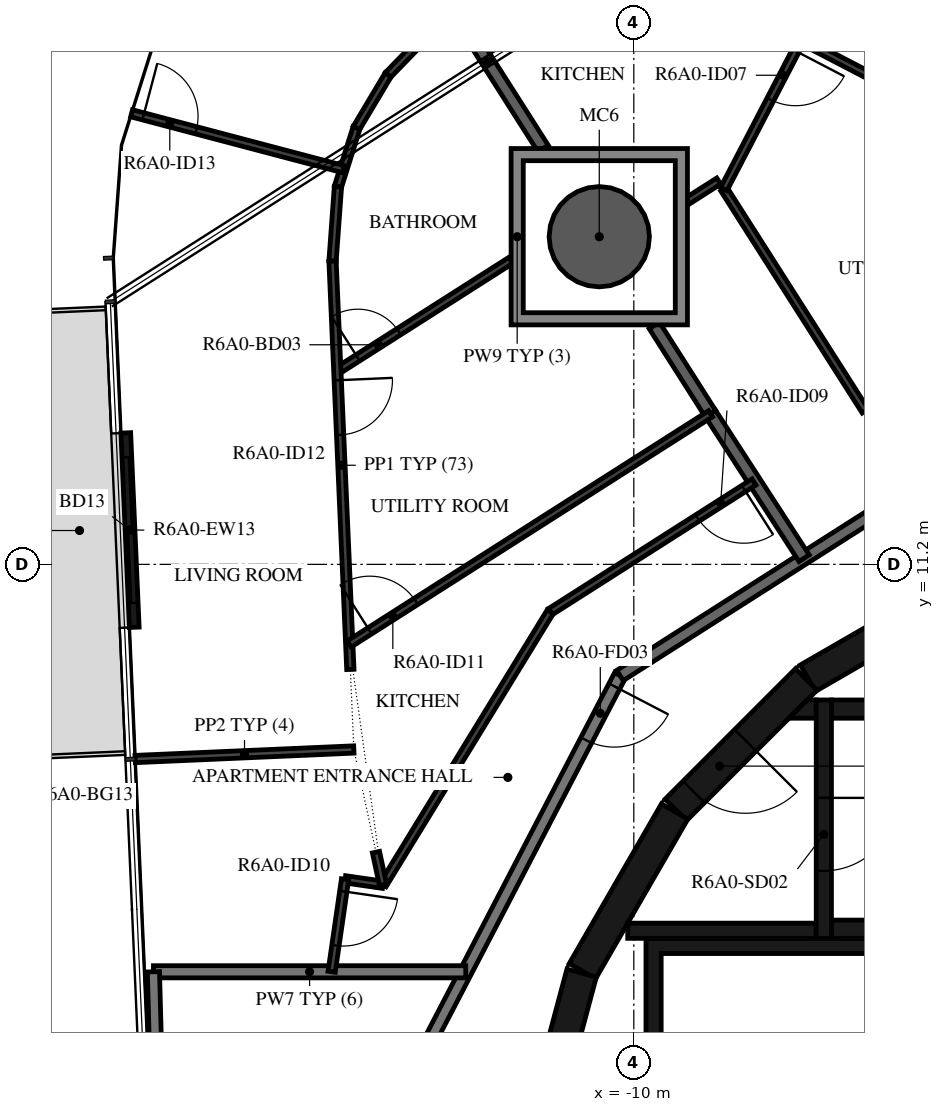
"""IFC4 building model, lengths in metres.
Left out: names, types, materials, properties, quantities, classifications, styles, units other than length and angle.
Written with IfcOpenShell. Run it as: python <this file> out.ifc"""

import sys

from ifc_helpers import new_model, si_unit, direction, frame, frame_2d, origin, origin_2d, place, context, subcontext, project, spatial, polyline, rectangle, hollow_circle, outline, extrude, element, fill, save


model = new_model("IFC4")
c1 = context("Model", 3, precision=1e-05, world=origin(), true_north=direction((0.0, 1.0)))
c2 = subcontext(c1, "Body", "Model", "MODEL_VIEW")
j1 = project(units=[si_unit("LENGTHUNIT", "METRE"), si_unit("PLANEANGLEUNIT", "RADIAN")], contexts=[c1])
p1 = place(None, origin())
s1 = spatial("IfcSite", under=j1, at=p1, CompositionType="ELEMENT")
p2 = place(p1, origin())
s2 = spatial("IfcBuilding", under=s1, at=p2, CompositionType="ELEMENT")
p3 = place(p2, frame((0.0, 0.0, 233.7)))
s3 = spatial("IfcBuildingStorey", under=s2, at=p3, CompositionType="ELEMENT", Elevation=233.7)
p4 = place(p3, frame((-10.568, 16.588, -0.38), z_axis=(0.0, 0.0, 1.0), x_axis=(1.0, 0.0, 0.0)))
e1 = element("IfcColumn", 1, at=p4, inside=s3, PredefinedType="COLUMN", context=c2, shape_type="SweptSolid", body=[
    extrude(hollow_circle(Radius=0.825, WallThickness=0.04, at=origin_2d()), origin(), (0.0, 0.0, 1.0), 3.5),
])
p5 = place(p3, frame((-18.355, 13.362, 0.0), z_axis=(0.0, 0.0, 1.0), x_axis=(0.043639181999, -0.999047357133, 0.0)))
e2 = element("IfcWall", 2, at=p5, inside=s3, PredefinedType="STANDARD", context=c2, shape_type="SweptSolid", body=[
    extrude(rectangle(XDim=3.2, YDim=0.16, at=frame_2d((1.6, 0.0))), origin(), (0.0, 0.0, 1.0), 3.12),
])
p6 = place(p5, frame((0.4, 0.0, 0.0)))
e3 = element("IfcOpeningElement", 3, at=p6, cuts=e2, PredefinedType="OPENING", context=c2, shape_type="SweptSolid", body=[
    extrude(rectangle(XDim=2.4, YDim=2.4, at=frame_2d((1.2, 1.2))), frame((0.0, 0.09, 0.0), z_axis=(0.0, -1.0, 0.0), x_axis=(1.0, 0.0, 0.0)), (0.0, 0.0, 1.0), 0.18),
])
p7 = place(p3, frame((-4.51, 10.845, 0.0), z_axis=(0.0, 0.0, 1.0), x_axis=(-0.865975092491, -0.500087131594, 0.0)))
e4 = element("IfcWall", 4, at=p7, inside=s3, PredefinedType="SHEAR", context=c2, shape_type="SweptSolid", body=[
    extrude(rectangle(XDim=3.033, YDim=0.5, at=frame_2d((1.516, 0.0))), origin(), (0.0, 0.0, 1.0), 3.12),
])
p8 = place(p3, frame((-7.164, 9.308, 0.0), z_axis=(0.0, 0.0, 1.0), x_axis=(-0.707106781187, -0.707106781187, 0.0)))
e5 = element("IfcWall", 5, at=p8, inside=s3, PredefinedType="SHEAR", context=c2, shape_type="SweptSolid", body=[
    extrude(rectangle(XDim=3.032, YDim=0.5, at=frame_2d((1.516, 0.0))), origin(), (0.0, 0.0, 1.0), 3.12),
])
p9 = place(p8, frame((1.416, 0.0, 0.0)))
e6 = element("IfcOpeningElement", 6, at=p9, cuts=e5, PredefinedType="OPENING", context=c2, shape_type="SweptSolid", body=[
    extrude(rectangle(XDim=1.2, YDim=2.1, at=frame_2d((0.6, 1.05))), frame((0.0, 0.26, 0.0), z_axis=(0.0, -1.0, 0.0), x_axis=(1.0, 0.0, 0.0)), (0.0, 0.0, 1.0), 0.52),
])
for number, where, z_axis, x_axis in (
    (7, (-9.329, 7.137, 0.0), (0.0, 0.0, 1.0), (-0.5, -0.866, 0.0)),
    (8, (-10.858, 4.479, 0.0), (0.0, 0.0, 1.0), (-0.259, -0.966, 0.0)),
):
    element("IfcWall", number, at=place(p3, frame(where, z_axis=z_axis, x_axis=x_axis)), inside=s3, PredefinedType="SHEAR", context=c2, shape_type="SweptSolid", body=[
        extrude(rectangle(XDim=3.033, YDim=0.5, at=frame_2d((1.516, 0.0))), origin(), (0.0, 0.0, 1.0), 3.12),
    ])
for number, where, z_axis, x_axis in (
    (9, (-6.75, 5.2, 0.0), (0.0, 0.0, 1.0), (1.0, 0.0, 0.0)),
    (10, (-6.75, 8.82, 0.0), (0.0, 0.0, 1.0), (1.0, 0.0, 0.0)),
):
    element("IfcWall", number, at=place(p3, frame(where, z_axis=z_axis, x_axis=x_axis)), inside=s3, PredefinedType="SHEAR", context=c2, shape_type="SweptSolid", body=[
        extrude(rectangle(XDim=6.75, YDim=0.3, at=frame_2d((3.375, 0.0))), origin(), (0.0, 0.0, 1.0), 3.12),
    ])
p10 = place(p3, frame((-6.875, 8.97, 0.0), z_axis=(0.0, 0.0, 1.0), x_axis=(0.0, -1.0, 0.0)))
e11 = element("IfcWall", 11, at=p10, inside=s3, PredefinedType="SHEAR", context=c2, shape_type="SweptSolid", body=[
    extrude(rectangle(XDim=3.92, YDim=0.25, at=frame_2d((1.96, 0.0))), origin(), (0.0, 0.0, 1.0), 3.12),
])
p11 = place(p10, frame((1.61, 0.0, 0.0)))
e12 = element("IfcOpeningElement", 12, at=p11, cuts=e11, PredefinedType="OPENING", context=c2, shape_type="SweptSolid", body=[
    extrude(rectangle(XDim=1.2, YDim=2.1, at=frame_2d((0.6, 1.05))), frame((0.0, 0.135, 0.0), z_axis=(0.0, -1.0, 0.0), x_axis=(1.0, 0.0, 0.0)), (0.0, 0.0, 1.0), 0.27),
])
p12 = place(p3, frame((-7.0, 5.175, 0.0), z_axis=(0.0, 0.0, 1.0), x_axis=(-1.0, 0.0, 0.0)))
e13 = element("IfcWall", 13, at=p12, inside=s3, PredefinedType="SHEAR", context=c2, shape_type="SweptSolid", body=[
    extrude(rectangle(XDim=3.1, YDim=0.25, at=frame_2d((1.55, 0.0))), origin(), (0.0, 0.0, 1.0), 3.12),
])
p13 = place(p3, origin())
e14 = element("IfcWall", 14, at=p13, inside=s3, PredefinedType="SHEAR", context=c2, shape_type="SweptSolid", body=[
    extrude(outline(polyline([(-7.148, 8.97), (-7.0, 8.97), (-7.0, 8.67), (-7.448, 8.67), (-7.148, 8.97)])), origin(), (0.0, 0.0, 1.0), 3.12),
])
p14 = place(p3, origin())
e15 = element("IfcWall", 15, at=p14, inside=s3, PredefinedType="SHEAR", context=c2, shape_type="SweptSolid", body=[
    extrude(outline(polyline([(-9.55, 4.8), (-5.5, 4.8), (-5.5, 1.9), (-5.25, 1.9), (-5.25, 4.8), (-1.2, 4.8), (-1.2, 1.9), (-0.95, 1.9), (-0.95, 4.8), (0.95, 4.8), (0.95, 1.9), (1.2, 1.9), (1.2, 4.8), (3.1, 4.8), (3.1, 1.9), (3.35, 1.9), (3.35, 4.8), (5.25, 4.8), (5.25, 1.9), (5.5, 1.9), (5.5, 4.8), (7.4, 4.8), (7.4, 1.9), (7.65, 1.9), (7.65, 4.8), (9.55, 4.8), (9.55, 1.9), (9.8, 1.9), (9.8, 4.8), (9.8, 5.05), (-9.8, 5.05), (-9.8, 4.8), (-9.8, 1.9), (-9.55, 1.9), (-9.55, 4.8)])), origin(), (0.0, 0.0, 1.0), 3.12),
])
p15 = place(p3, frame((-10.228, 9.372, 0.0), z_axis=(0.0, 0.0, 1.0), x_axis=(-0.461759464021, -0.887005184532, 0.0)))
e16 = element("IfcWall", 16, at=p15, inside=s3, PredefinedType="STANDARD", context=c2, shape_type="SweptSolid", body=[
    extrude(rectangle(XDim=7.181, YDim=0.2, at=frame_2d((3.591, 0.0))), origin(), (0.0, 0.0, 1.0), 3.12),
])
p16 = place(p15, frame((0.2, 0.0, 0.0)))
e17 = element("IfcOpeningElement", 17, at=p16, cuts=e16, PredefinedType="OPENING", context=c2, shape_type="SweptSolid", body=[
    extrude(rectangle(XDim=1.0, YDim=2.1, at=frame_2d((0.5, 1.05))), frame((0.0, 0.11, 0.0), z_axis=(0.0, -1.0, 0.0), x_axis=(1.0, 0.0, 0.0)), (0.0, 0.0, 1.0), 0.22),
])
p17 = place(p3, frame((-4.172, 13.231, 0.0), z_axis=(0.0, 0.0, 1.0), x_axis=(-0.843388394728, -0.537304397561, 0.0)))
e18 = element("IfcWall", 18, at=p17, inside=s3, PredefinedType="STANDARD", context=c2, shape_type="SweptSolid", body=[
    extrude(rectangle(XDim=7.181, YDim=0.2, at=frame_2d((3.59, 0.0))), origin(), (0.0, 0.0, 1.0), 3.12),
])
p18 = place(p3, frame((-12.764, 4.5, 0.0), z_axis=(0.0, 0.0, 1.0), x_axis=(-1.0, 0.0, 0.0)))
e19 = element("IfcWall", 19, at=p18, inside=s3, PredefinedType="STANDARD", context=c2, shape_type="SweptSolid", body=[
    extrude(rectangle(XDim=5.135, YDim=0.2, at=frame_2d((2.568, 0.0))), origin(), (0.0, 0.0, 1.0), 3.12),
])
p19 = place(p3, frame((-17.9, 4.5, 0.0), z_axis=(0.0, 0.0, 1.0), x_axis=(0.027204178319, -0.999629897853, 0.0)))
e20 = element("IfcWall", 20, at=p19, inside=s3, PredefinedType="STANDARD", context=c2, shape_type="SweptSolid", body=[
    extrude(rectangle(XDim=2.468, YDim=0.2, at=frame_2d((1.234, 0.0))), origin(), (0.0, 0.0, 1.0), 3.12),
])
p20 = place(p3, frame((-8.738, 13.677, 0.0), z_axis=(0.0, 0.0, 1.0), x_axis=(0.54358037296, -0.839357121929, 0.0)))
e21 = element("IfcWall", 21, at=p20, inside=s3, PredefinedType="STANDARD", context=c2, shape_type="SweptSolid", body=[
    extrude(rectangle(XDim=2.83, YDim=0.2, at=frame_2d((1.415, 0.0))), origin(), (0.0, 0.0, 1.0), 3.12),
])
p21 = place(p3, frame((-9.663, 15.129, 0.0), z_axis=(0.0, 0.0, 1.0), x_axis=(0.537205715853, -0.843451254581, 0.0)))
e22 = element("IfcWall", 22, at=p21, inside=s3, PredefinedType="STANDARD", context=c2, shape_type="SweptSolid", body=[
    extrude(rectangle(XDim=1.722, YDim=0.2, at=frame_2d((0.861, 0.0))), origin(), (0.0, 0.0, 1.0), 3.12),
])
p22 = place(p3, frame((-14.837, 23.29, 0.0), z_axis=(0.0, 0.0, 1.0), x_axis=(0.537316863221, -0.843380452998, 0.0)))
e23 = element("IfcWall", 23, at=p22, inside=s3, PredefinedType="STANDARD", context=c2, shape_type="SweptSolid", body=[
    extrude(rectangle(XDim=6.227, YDim=0.2, at=frame_2d((3.113, 0.0))), origin(), (0.0, 0.0, 1.0), 3.12),
])
p23 = place(p3, frame((-4.639, 14.712, 0.0), z_axis=(0.0, 0.0, 1.0), x_axis=(-0.843361471414, -0.537346655833, 0.0)))
e24 = element("IfcWall", 24, at=p23, inside=s3, PredefinedType="PARTITIONING", context=c2, shape_type="SweptSolid", body=[
    extrude(rectangle(XDim=1.844, YDim=0.12, at=frame_2d((0.922, 0.0))), origin(), (0.0, 0.0, 1.0), 3.12),
])
p24 = place(p23, frame((0.2, 0.0, 0.0)))
e25 = element("IfcOpeningElement", 25, at=p24, cuts=e24, PredefinedType="OPENING", context=c2, shape_type="SweptSolid", body=[
    extrude(rectangle(XDim=0.9, YDim=2.1, at=frame_2d((0.45, 1.05))), frame((0.0, 0.07, 0.0), z_axis=(0.0, -1.0, 0.0), x_axis=(1.0, 0.0, 0.0)), (0.0, 0.0, 1.0), 0.14),
])
p25 = place(p3, frame((-6.194, 13.721, 0.0), z_axis=(0.0, 0.0, 1.0), x_axis=(-0.537316807294, 0.843380488629, 0.0)))
e26 = element("IfcWall", 26, at=p25, inside=s3, PredefinedType="PARTITIONING", context=c2, shape_type="SweptSolid", body=[
    extrude(rectangle(XDim=4.331, YDim=0.12, at=frame_2d((2.165, 0.0))), origin(), (0.0, 0.0, 1.0), 3.12),
])
p26 = place(p3, frame((-8.604, 17.504, 0.0), z_axis=(0.0, 0.0, 1.0), x_axis=(-0.843265746233, -0.537496866251, 0.0)))
e27 = element("IfcWall", 27, at=p26, inside=s3, PredefinedType="PARTITIONING", context=c2, shape_type="SweptSolid", body=[
    extrude(rectangle(XDim=0.61, YDim=0.12, at=frame_2d((0.305, 0.0))), origin(), (0.0, 0.0, 1.0), 3.12),
])
p27 = place(p3, frame((-8.35, 20.394, 0.0), z_axis=(0.0, 0.0, 1.0), x_axis=(0.887020940825, -0.461729196107, 0.0)))
e28 = element("IfcWall", 28, at=p27, inside=s3, PredefinedType="PARTITIONING", context=c2, shape_type="SweptSolid", body=[
    extrude(rectangle(XDim=11.678, YDim=0.12, at=frame_2d((5.839, 0.0))), origin(), (0.0, 0.0, 1.0), 3.12),
])
p28 = place(p3, frame((-7.247, 19.82, 0.0), z_axis=(0.0, 0.0, 1.0), x_axis=(-0.46174004932, -0.887015291218, 0.0)))
e29 = element("IfcWall", 29, at=p28, inside=s3, PredefinedType="PARTITIONING", context=c2, shape_type="SweptSolid", body=[
    extrude(rectangle(XDim=2.759, YDim=0.12, at=frame_2d((1.379, 0.0))), origin(), (0.0, 0.0, 1.0), 3.12),
])
p29 = place(p28, frame((0.2, 0.0, 0.0)))
e30 = element("IfcOpeningElement", 30, at=p29, cuts=e29, PredefinedType="OPENING", context=c2, shape_type="SweptSolid", body=[
    extrude(rectangle(XDim=0.9, YDim=2.1, at=frame_2d((0.45, 1.05))), frame((0.0, 0.07, 0.0), z_axis=(0.0, -1.0, 0.0), x_axis=(1.0, 0.0, 0.0)), (0.0, 0.0, 1.0), 0.14),
])
p30 = place(p3, frame((-8.023, 12.555, 0.0), z_axis=(0.0, 0.0, 1.0), x_axis=(-0.843408270233, -0.537273198385, 0.0)))
e31 = element("IfcWall", 31, at=p30, inside=s3, PredefinedType="PARTITIONING", context=c2, shape_type="SweptSolid", body=[
    extrude(rectangle(XDim=3.971, YDim=0.12, at=frame_2d((1.986, 0.0))), origin(), (0.0, 0.0, 1.0), 3.12),
])
p31 = place(p30, frame((0.2, 0.0, 0.0)))
e32 = element("IfcOpeningElement", 32, at=p31, cuts=e31, PredefinedType="OPENING", context=c2, shape_type="SweptSolid", body=[
    extrude(rectangle(XDim=0.9, YDim=2.1, at=frame_2d((0.45, 1.05))), frame((0.0, 0.07, 0.0), z_axis=(0.0, -1.0, 0.0), x_axis=(1.0, 0.0, 0.0)), (0.0, 0.0, 1.0), 0.14),
])
p32 = place(p3, frame((-11.373, 10.421, 0.0), z_axis=(0.0, 0.0, 1.0), x_axis=(-0.522435957358, -0.852678527031, 0.0)))
e33 = element("IfcWall", 33, at=p32, inside=s3, PredefinedType="PARTITIONING", context=c2, shape_type="SweptSolid", body=[
    extrude(rectangle(XDim=5.267, YDim=0.12, at=frame_2d((2.633, 0.0))), origin(), (0.0, 0.0, 1.0), 3.12),
])
p33 = place(p3, frame((-14.125, 5.931, 0.0), z_axis=(0.0, 0.0, 1.0), x_axis=(-0.989621518838, 0.143698467119, 0.0)))
e34 = element("IfcWall", 34, at=p33, inside=s3, PredefinedType="PARTITIONING", context=c2, shape_type="SweptSolid", body=[
    extrude(rectangle(XDim=0.63, YDim=0.12, at=frame_2d((0.315, 0.0))), origin(), (0.0, 0.0, 1.0), 3.12),
])
p34 = place(p3, frame((-14.748, 6.021, 0.0), z_axis=(0.0, 0.0, 1.0), x_axis=(-0.143888945672, -0.98959384159, 0.0)))
e35 = element("IfcWall", 35, at=p34, inside=s3, PredefinedType="PARTITIONING", context=c2, shape_type="SweptSolid", body=[
    extrude(rectangle(XDim=1.537, YDim=0.12, at=frame_2d((0.769, 0.0))), origin(), (0.0, 0.0, 1.0), 3.12),
])
p35 = place(p34, frame((0.2, 0.0, 0.0)))
e36 = element("IfcOpeningElement", 36, at=p35, cuts=e35, PredefinedType="OPENING", context=c2, shape_type="SweptSolid", body=[
    extrude(rectangle(XDim=0.9, YDim=2.1, at=frame_2d((0.45, 1.05))), frame((0.0, 0.07, 0.0), z_axis=(0.0, -1.0, 0.0), x_axis=(1.0, 0.0, 0.0)), (0.0, 0.0, 1.0), 0.14),
])
for number, where, z_axis, x_axis in (
    (37, (-14.865, 17.411, 0.0), (0.0, 0.0, 1.0), (0.301, 0.954, 0.0)),
    (38, (-14.56, 18.38, 0.0), (0.0, 0.0, 1.0), (0.513, 0.859, 0.0)),
    (39, (-14.039, 19.252, 0.0), (0.0, 0.0, 1.0), (0.697, 0.717, 0.0)),
):
    element("IfcWall", number, at=place(p3, frame(where, z_axis=z_axis, x_axis=x_axis)), inside=s3, PredefinedType="PARTITIONING", context=c2, shape_type="SweptSolid", body=[
        extrude(rectangle(XDim=1.016, YDim=0.12, at=frame_2d((0.508, 0.0))), origin(), (0.0, 0.0, 1.0), 3.12),
    ])
p36 = place(p3, frame((-18.26, 18.618, 0.0), z_axis=(0.0, 0.0, 1.0), x_axis=(0.96689176932, -0.25518680691, 0.0)))
e40 = element("IfcWall", 40, at=p36, inside=s3, PredefinedType="PARTITIONING", context=c2, shape_type="SweptSolid", body=[
    extrude(rectangle(XDim=3.604, YDim=0.12, at=frame_2d((1.802, 0.0))), origin(), (0.0, 0.0, 1.0), 3.12),
])
p37 = place(p36, frame((0.2, 0.0, 0.0)))
e41 = element("IfcOpeningElement", 41, at=p37, cuts=e40, PredefinedType="OPENING", context=c2, shape_type="SweptSolid", body=[
    extrude(rectangle(XDim=0.9, YDim=2.1, at=frame_2d((0.45, 1.05))), frame((0.0, 0.07, 0.0), z_axis=(0.0, -1.0, 0.0), x_axis=(1.0, 0.0, 0.0)), (0.0, 0.0, 1.0), 0.14),
])
p38 = place(p3, frame((-14.876, 14.382, 0.0), z_axis=(0.0, 0.0, 1.0), x_axis=(0.843409222082, 0.537271704175, 0.0)))
e42 = element("IfcWall", 42, at=p38, inside=s3, PredefinedType="PARTITIONING", context=c2, shape_type="SweptSolid", body=[
    extrude(rectangle(XDim=3.388, YDim=0.12, at=frame_2d((1.694, 0.0))), origin(), (0.0, 0.0, 1.0), 3.12),
])
p39 = place(p38, frame((0.4, 0.0, 0.0)))
e43 = element("IfcOpeningElement", 43, at=p39, cuts=e42, PredefinedType="OPENING", context=c2, shape_type="SweptSolid", body=[
    extrude(rectangle(XDim=0.8, YDim=2.1, at=frame_2d((0.4, 1.05))), frame((0.0, 0.07, 0.0), z_axis=(0.0, -1.0, 0.0), x_axis=(1.0, 0.0, 0.0)), (0.0, 0.0, 1.0), 0.14),
])
p40 = place(p3, frame((-14.865, 17.411, 0.0), z_axis=(0.0, 0.0, 1.0), x_axis=(-0.072618457011, -0.997359794508, 0.0)))
e44 = element("IfcWall", 44, at=p40, inside=s3, PredefinedType="PARTITIONING", context=c2, shape_type="SweptSolid", body=[
    extrude(rectangle(XDim=1.227, YDim=0.12, at=frame_2d((0.614, 0.0))), origin(), (0.0, 0.0, 1.0), 3.12),
])
p41 = place(p3, frame((-14.955, 16.187, 0.0), z_axis=(0.0, 0.0, 1.0), x_axis=(0.043591713888, -0.999049429448, 0.0)))
e45 = element("IfcWall", 45, at=p41, inside=s3, PredefinedType="PARTITIONING", context=c2, shape_type="SweptSolid", body=[
    extrude(rectangle(XDim=6.721, YDim=0.12, at=frame_2d((3.36, 0.0))), origin(), (0.0, 0.0, 1.0), 3.12),
])
p42 = place(p41, frame((1.961, 0.0, 0.0)))
e46 = element("IfcOpeningElement", 46, at=p42, cuts=e45, PredefinedType="OPENING", context=c2, shape_type="SweptSolid", body=[
    extrude(rectangle(XDim=0.9, YDim=2.1, at=frame_2d((0.45, 1.05))), frame((0.0, 0.07, 0.0), z_axis=(0.0, -1.0, 0.0), x_axis=(1.0, 0.0, 0.0)), (0.0, 0.0, 1.0), 0.14),
])
p43 = place(p3, frame((-14.68, 9.891, 0.0), z_axis=(0.0, 0.0, 1.0), x_axis=(0.843391697183, 0.537299213774, 0.0)))
e47 = element("IfcWall", 47, at=p43, inside=s3, PredefinedType="PARTITIONING", context=c2, shape_type="SweptSolid", body=[
    extrude(rectangle(XDim=7.045, YDim=0.12, at=frame_2d((3.522, 0.0))), origin(), (0.0, 0.0, 1.0), 3.12),
])
p44 = place(p43, frame((0.4, 0.0, 0.0)))
e48 = element("IfcOpeningElement", 48, at=p44, cuts=e47, PredefinedType="OPENING", context=c2, shape_type="SweptSolid", body=[
    extrude(rectangle(XDim=0.9, YDim=2.1, at=frame_2d((0.45, 1.05))), frame((0.0, 0.07, 0.0), z_axis=(0.0, -1.0, 0.0), x_axis=(1.0, 0.0, 0.0)), (0.0, 0.0, 1.0), 0.14),
])
p45 = place(p3, frame((-14.24, 6.467, 0.0), z_axis=(0.0, 0.0, 1.0), x_axis=(0.210896225868, -0.977508456186, 0.0)))
e49 = element("IfcWall", 49, at=p45, inside=s3, PredefinedType="PARTITIONING", context=c2, shape_type="SweptSolid", body=[
    extrude(rectangle(XDim=0.549, YDim=0.12, at=frame_2d((0.274, 0.0))), origin(), (0.0, 0.0, 1.0), 3.12),
])
p46 = place(p3, frame((-18.201, 7.999, 0.0), z_axis=(0.0, 0.0, 1.0), x_axis=(0.999048850974, 0.043604969534, 0.0)))
e50 = element("IfcWall", 50, at=p46, inside=s3, PredefinedType="PARTITIONING", context=c2, shape_type="SweptSolid", body=[
    extrude(rectangle(XDim=3.6, YDim=0.12, at=frame_2d((1.8, 0.0))), origin(), (0.0, 0.0, 1.0), 2.73),
])
p47 = place(p3, origin())
e51 = element("IfcWall", 51, at=p47, inside=s3, PredefinedType="STANDARD", context=c2, shape_type="SweptSolid", body=[
    extrude(outline(polyline([(-9.118, 18.038), (-9.118, 15.138), (-12.018, 15.138), (-12.018, 18.038), (-9.118, 18.038)]), holes=[polyline([(-11.818, 15.338), (-9.318, 15.338), (-9.318, 17.838), (-11.818, 17.838), (-11.818, 15.338)])]), origin(), (0.0, 0.0, 1.0), 3.12),
])
p48 = place(p6, origin())
e52 = element("IfcDoor", 52, at=p48, inside=s3, OperationType="DOUBLE_DOOR_SLIDING", PredefinedType="DOOR", context=c2, shape_type="SweptSolid", body=[
    extrude(rectangle(XDim=2.4, YDim=2.4, at=frame_2d((1.2, 1.2))), frame((0.0, 0.025, 0.0), z_axis=(0.0, -1.0, 0.0), x_axis=(1.0, 0.0, 0.0)), (0.0, 0.0, 1.0), 0.05),
])
fill(e3, e52)
p49 = place(p11, origin())
e53 = element("IfcDoor", 53, at=p49, inside=s3, OperationType="SINGLE_SWING_LEFT", PredefinedType="DOOR", context=c2, shape_type="SweptSolid", body=[
    extrude(rectangle(XDim=1.2, YDim=2.1, at=frame_2d((0.6, 1.05))), frame((0.0, 0.025, 0.0), z_axis=(0.0, -1.0, 0.0), x_axis=(1.0, 0.0, 0.0)), (0.0, 0.0, 1.0), 0.05),
])
fill(e12, e53)
p50 = place(p9, origin())
e54 = element("IfcDoor", 54, at=p50, inside=s3, OperationType="SINGLE_SWING_RIGHT", PredefinedType="DOOR", context=c2, shape_type="SweptSolid", body=[
    extrude(rectangle(XDim=1.2, YDim=2.1, at=frame_2d((0.6, 1.05))), frame((0.0, 0.025, 0.0), z_axis=(0.0, -1.0, 0.0), x_axis=(1.0, 0.0, 0.0)), (0.0, 0.0, 1.0), 0.05),
])
fill(e6, e54)
p51 = place(p29, origin())
e55 = element("IfcDoor", 55, at=p51, inside=s3, OperationType="SINGLE_SWING_RIGHT", PredefinedType="DOOR", context=c2, shape_type="SweptSolid", body=[
    extrude(rectangle(XDim=0.9, YDim=2.1, at=frame_2d((0.45, 1.05))), frame((0.0, 0.025, 0.0), z_axis=(0.0, -1.0, 0.0), x_axis=(1.0, 0.0, 0.0)), (0.0, 0.0, 1.0), 0.05),
])
fill(e30, e55)
p52 = place(p16, origin())
e56 = element("IfcDoor", 56, at=p52, inside=s3, OperationType="SINGLE_SWING_LEFT", PredefinedType="DOOR", context=c2, shape_type="SweptSolid", body=[
    extrude(rectangle(XDim=1.0, YDim=2.1, at=frame_2d((0.5, 1.05))), frame((0.0, 0.025, 0.0), z_axis=(0.0, -1.0, 0.0), x_axis=(1.0, 0.0, 0.0)), (0.0, 0.0, 1.0), 0.05),
])
fill(e17, e56)
p53 = place(p31, origin())
e57 = element("IfcDoor", 57, at=p53, inside=s3, OperationType="SINGLE_SWING_LEFT", PredefinedType="DOOR", context=c2, shape_type="SweptSolid", body=[
    extrude(rectangle(XDim=0.9, YDim=2.1, at=frame_2d((0.45, 1.05))), frame((0.0, 0.025, 0.0), z_axis=(0.0, -1.0, 0.0), x_axis=(1.0, 0.0, 0.0)), (0.0, 0.0, 1.0), 0.05),
])
fill(e32, e57)
p54 = place(p35, origin())
e58 = element("IfcDoor", 58, at=p54, inside=s3, OperationType="SINGLE_SWING_LEFT", PredefinedType="DOOR", context=c2, shape_type="SweptSolid", body=[
    extrude(rectangle(XDim=0.9, YDim=2.1, at=frame_2d((0.45, 1.05))), frame((0.0, 0.025, 0.0), z_axis=(0.0, -1.0, 0.0), x_axis=(1.0, 0.0, 0.0)), (0.0, 0.0, 1.0), 0.05),
])
fill(e36, e58)
p55 = place(p44, origin())
e59 = element("IfcDoor", 59, at=p55, inside=s3, OperationType="SINGLE_SWING_LEFT", PredefinedType="DOOR", context=c2, shape_type="SweptSolid", body=[
    extrude(rectangle(XDim=0.9, YDim=2.1, at=frame_2d((0.45, 1.05))), frame((0.0, 0.025, 0.0), z_axis=(0.0, -1.0, 0.0), x_axis=(1.0, 0.0, 0.0)), (0.0, 0.0, 1.0), 0.05),
])
fill(e48, e59)
p56 = place(p39, origin())
e60 = element("IfcDoor", 60, at=p56, inside=s3, OperationType="SINGLE_SWING_LEFT", PredefinedType="DOOR", context=c2, shape_type="SweptSolid", body=[
    extrude(rectangle(XDim=0.8, YDim=2.1, at=frame_2d((0.4, 1.05))), frame((0.0, 0.025, 0.0), z_axis=(0.0, -1.0, 0.0), x_axis=(1.0, 0.0, 0.0)), (0.0, 0.0, 1.0), 0.05),
])
fill(e43, e60)
p57 = place(p42, origin())
e61 = element("IfcDoor", 61, at=p57, inside=s3, OperationType="SINGLE_SWING_LEFT", PredefinedType="DOOR", context=c2, shape_type="SweptSolid", body=[
    extrude(rectangle(XDim=0.9, YDim=2.1, at=frame_2d((0.45, 1.05))), frame((0.0, 0.025, 0.0), z_axis=(0.0, -1.0, 0.0), x_axis=(1.0, 0.0, 0.0)), (0.0, 0.0, 1.0), 0.05),
])
fill(e46, e61)
p58 = place(p37, origin())
e62 = element("IfcDoor", 62, at=p58, inside=s3, OperationType="SINGLE_SWING_LEFT", PredefinedType="DOOR", context=c2, shape_type="SweptSolid", body=[
    extrude(rectangle(XDim=0.9, YDim=2.1, at=frame_2d((0.45, 1.05))), frame((0.0, 0.025, 0.0), z_axis=(0.0, -1.0, 0.0), x_axis=(1.0, 0.0, 0.0)), (0.0, 0.0, 1.0), 0.05),
])
fill(e41, e62)
save(model, sys.argv[1])
